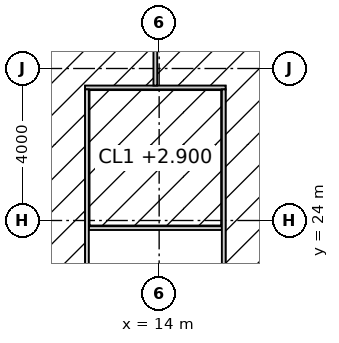
"""IFC4 building model, lengths in metres.
Left out: names, types, materials, properties, quantities, classifications, styles, units other than length and angle.
Written with IfcOpenShell. Run it as: python <this file> out.ifc"""

import sys

from ifc_helpers import new_model, si_unit, direction, frame, frame_2d, origin, place, context, subcontext, project, spatial, rectangle, extrude, element, fill, save


model = new_model("IFC4")
c1 = context("Model", 3, precision=1e-05, world=origin(), true_north=direction((0.0, 1.0)))
c2 = subcontext(c1, "Body", "Model", "MODEL_VIEW")
j1 = project(units=[si_unit("LENGTHUNIT", "METRE"), si_unit("PLANEANGLEUNIT", "RADIAN")], contexts=[c1])
p1 = place(None, origin())
s1 = spatial("IfcSite", under=j1, at=p1, CompositionType="ELEMENT")
p2 = place(p1, origin())
s2 = spatial("IfcBuilding", under=s1, at=p2, CompositionType="ELEMENT")
p3 = place(p2, frame((0.0, 0.0, 187.8)))
s3 = spatial("IfcBuildingStorey", under=s2, at=p3, CompositionType="ELEMENT", Elevation=187.8)
p4 = place(p3, frame((12.15, 23.8, 0.0), z_axis=(0.0, 0.0, 1.0), x_axis=(1.0, 0.0, 0.0)))
e1 = element("IfcWall", 1, at=p4, inside=s3, PredefinedType="PARTITIONING", context=c2, shape_type="SweptSolid", body=[
    extrude(rectangle(XDim=3.5, YDim=0.1, at=frame_2d((1.75, 0.0))), origin(), (0.0, 0.0, 1.0), 2.95),
])
p5 = place(p3, frame((12.05, 27.5, 0.0), z_axis=(0.0, 0.0, 1.0), x_axis=(1.0, 0.0, 0.0)))
e2 = element("IfcWall", 2, at=p5, inside=s3, PredefinedType="PARTITIONING", context=c2, shape_type="SweptSolid", body=[
    extrude(rectangle(XDim=3.7, YDim=0.1, at=frame_2d((1.85, 0.0))), origin(), (0.0, 0.0, 1.0), 3.85),
])
p6 = place(p3, frame((12.1, 17.55, 0.0), z_axis=(0.0, 0.0, 1.0), x_axis=(0.0, 1.0, 0.0)))
e3 = element("IfcWall", 3, at=p6, inside=s3, PredefinedType="PARTITIONING", context=c2, shape_type="SweptSolid", body=[
    extrude(rectangle(XDim=9.9, YDim=0.1, at=frame_2d((4.95, 0.0))), origin(), (0.0, 0.0, 1.0), 3.85),
])
p7 = place(p6, frame((0.5, 0.0, 0.0)))
e4 = element("IfcOpeningElement", 4, at=p7, cuts=e3, PredefinedType="OPENING", context=c2, shape_type="SweptSolid", body=[
    extrude(rectangle(XDim=1.0, YDim=2.2, at=frame_2d((0.5, 1.1))), frame((0.0, 0.06, 0.0), z_axis=(0.0, -1.0, 0.0), x_axis=(1.0, 0.0, 0.0)), (0.0, 0.0, 1.0), 0.12),
])
p8 = place(p6, frame((2.6, 0.0, 0.0)))
e5 = element("IfcOpeningElement", 5, at=p8, cuts=e3, PredefinedType="OPENING", context=c2, shape_type="SweptSolid", body=[
    extrude(rectangle(XDim=1.0, YDim=2.2, at=frame_2d((0.5, 1.1))), frame((0.0, 0.06, 0.0), z_axis=(0.0, -1.0, 0.0), x_axis=(1.0, 0.0, 0.0)), (0.0, 0.0, 1.0), 0.12),
])
p9 = place(p6, frame((4.7, 0.0, 0.0)))
e6 = element("IfcOpeningElement", 6, at=p9, cuts=e3, PredefinedType="OPENING", context=c2, shape_type="SweptSolid", body=[
    extrude(rectangle(XDim=1.0, YDim=2.2, at=frame_2d((0.5, 1.1))), frame((0.0, 0.06, 0.0), z_axis=(0.0, -1.0, 0.0), x_axis=(1.0, 0.0, 0.0)), (0.0, 0.0, 1.0), 0.12),
])
p10 = place(p6, frame((7.6, 0.0, 0.0)))
e7 = element("IfcOpeningElement", 7, at=p10, cuts=e3, PredefinedType="OPENING", context=c2, shape_type="SweptSolid", body=[
    extrude(rectangle(XDim=1.0, YDim=2.2, at=frame_2d((0.5, 1.1))), frame((0.0, 0.06, 0.0), z_axis=(0.0, -1.0, 0.0), x_axis=(1.0, 0.0, 0.0)), (0.0, 0.0, 1.0), 0.12),
])
p11 = place(p3, frame((15.7, 17.55, 0.0), z_axis=(0.0, 0.0, 1.0), x_axis=(0.0, 1.0, 0.0)))
e8 = element("IfcWall", 8, at=p11, inside=s3, PredefinedType="PARTITIONING", context=c2, shape_type="SweptSolid", body=[
    extrude(rectangle(XDim=9.9, YDim=0.1, at=frame_2d((4.95, 0.0))), origin(), (0.0, 0.0, 1.0), 3.85),
])
p12 = place(p3, frame((13.9, 27.55, 0.0), z_axis=(0.0, 0.0, 1.0), x_axis=(0.0, 1.0, 0.0)))
e9 = element("IfcWall", 9, at=p12, inside=s3, PredefinedType="PARTITIONING", context=c2, shape_type="SweptSolid", body=[
    extrude(rectangle(XDim=28.15, YDim=0.1, at=frame_2d((14.075, 0.0))), origin(), (0.0, 0.0, 1.0), 2.95),
])
p13 = place(p12, frame((13.575, 0.0, 0.0)))
e10 = element("IfcOpeningElement", 10, at=p13, cuts=e9, PredefinedType="OPENING", context=c2, shape_type="SweptSolid", body=[
    extrude(rectangle(XDim=1.0, YDim=2.2, at=frame_2d((0.5, 1.1))), frame((0.0, 0.06, 0.0), z_axis=(0.0, -1.0, 0.0), x_axis=(1.0, 0.0, 0.0)), (0.0, 0.0, 1.0), 0.12),
])
p14 = place(p9, origin())
e11 = element("IfcDoor", 11, at=p14, inside=s3, OperationType="SINGLE_SWING_LEFT", PredefinedType="DOOR", context=c2, shape_type="SweptSolid", body=[
    extrude(rectangle(XDim=1.0, YDim=2.2, at=frame_2d((0.5, 1.1))), frame((0.0, 0.025, 0.0), z_axis=(0.0, -1.0, 0.0), x_axis=(1.0, 0.0, 0.0)), (0.0, 0.0, 1.0), 0.05),
])
fill(e6, e11)
p15 = place(p10, origin())
e12 = element("IfcDoor", 12, at=p15, inside=s3, OperationType="SINGLE_SWING_RIGHT", PredefinedType="DOOR", context=c2, shape_type="SweptSolid", body=[
    extrude(rectangle(XDim=1.0, YDim=2.2, at=frame_2d((0.5, 1.1))), frame((0.0, 0.025, 0.0), z_axis=(0.0, -1.0, 0.0), x_axis=(1.0, 0.0, 0.0)), (0.0, 0.0, 1.0), 0.05),
])
fill(e7, e12)
save(model, sys.argv[1])
